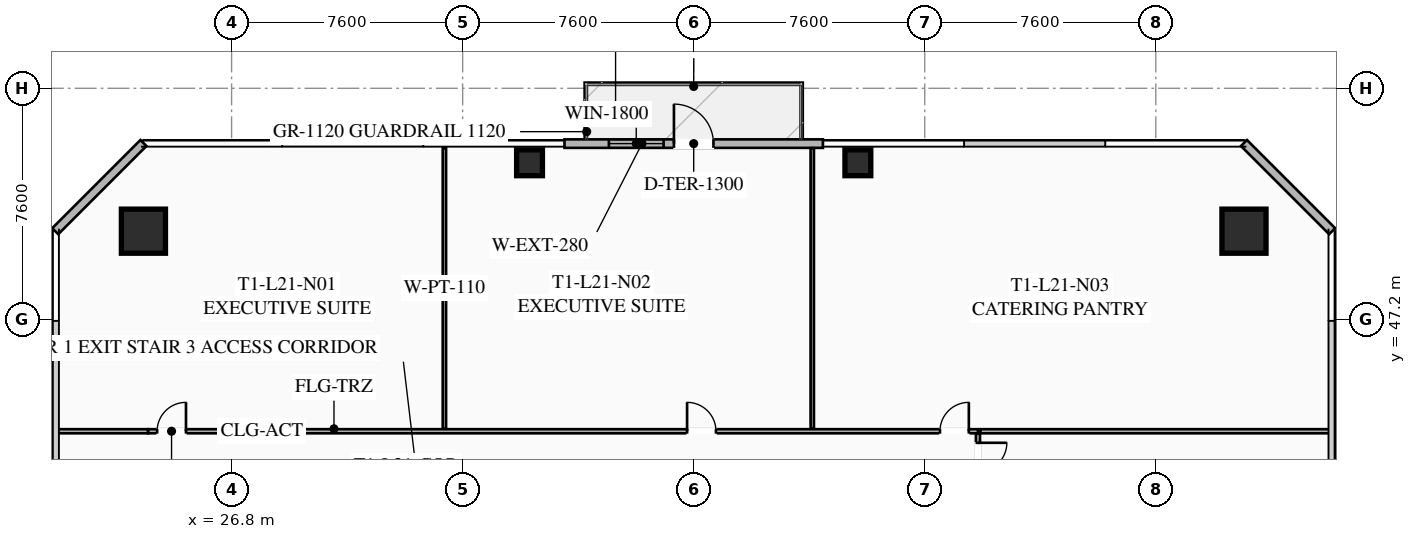
"""IFC4 building model, lengths in metres.
Left out: names, types, materials, properties, quantities, classifications, styles, units other than length and angle.
Written with IfcOpenShell. Run it as: python <this file> out.ifc"""

import sys

from ifc_helpers import new_model, si_unit, direction, frame, frame_2d, origin, origin_2d, place, context, subcontext, project, spatial, rectangle, hollow_rectangle, extrude, element, fill, save


model = new_model("IFC4")
c1 = context("Model", 3, precision=1e-05, world=origin(), true_north=direction((0.0, 1.0)))
c2 = subcontext(c1, "Body", "Model", "MODEL_VIEW")
j1 = project(units=[si_unit("LENGTHUNIT", "METRE"), si_unit("PLANEANGLEUNIT", "RADIAN")], contexts=[c1])
p1 = place(None, origin())
s1 = spatial("IfcSite", under=j1, at=p1, CompositionType="ELEMENT")
p2 = place(p1, origin())
s2 = spatial("IfcBuilding", under=s1, at=p2, CompositionType="ELEMENT")
p3 = place(p2, frame((0.0, 0.0, 81.4)))
s3 = spatial("IfcBuildingStorey", under=s2, at=p3, CompositionType="ELEMENT", Elevation=81.4)
for number, where, z_axis, x_axis in (
    (1, (60.1, 50.1, 0.0), (0.0, 0.0, 1.0), (1.0, 0.0, 0.0)),
    (2, (23.9, 50.1, 0.0), (0.0, 0.0, 1.0), (1.0, 0.0, 0.0)),
):
    element("IfcColumn", number, at=place(p3, frame(where, z_axis=z_axis, x_axis=x_axis)), inside=s3, PredefinedType="COLUMN", context=c2, shape_type="SweptSolid", body=[
        extrude(hollow_rectangle(XDim=1.45, YDim=1.45, WallThickness=0.055, at=origin_2d()), origin(), (0.0, 0.0, 1.0), 3.35),
    ])
for number, where, z_axis, x_axis in (
    (3, (47.4, 52.35, 0.0), (0.0, 0.0, 1.0), (1.0, 0.0, 0.0)),
    (4, (36.6, 52.35, 0.0), (0.0, 0.0, 1.0), (1.0, 0.0, 0.0)),
):
    element("IfcColumn", number, at=place(p3, frame(where, z_axis=z_axis, x_axis=x_axis)), inside=s3, PredefinedType="COLUMN", context=c2, shape_type="SweptSolid", body=[
        extrude(hollow_rectangle(XDim=0.85, YDim=0.85, WallThickness=0.035, at=origin_2d()), origin(), (0.0, 0.0, 1.0), 3.35),
    ])
p4 = place(p3, frame((37.75, 52.98, 0.0), z_axis=(0.0, 0.0, 1.0), x_axis=(1.0, 0.0, 0.0)))
e5 = element("IfcWall", 5, at=p4, inside=s3, PredefinedType="SOLIDWALL", context=c2, shape_type="SweptSolid", body=[
    extrude(rectangle(XDim=8.5, YDim=0.28, at=frame_2d((4.25, 0.0))), origin(), (0.0, 0.0, 1.0), 3.35),
])
p5 = place(p4, frame((3.6, 0.0, 0.0)))
e6 = element("IfcOpeningElement", 6, at=p5, cuts=e5, PredefinedType="OPENING", context=c2, shape_type="SweptSolid", body=[
    extrude(rectangle(XDim=1.3, YDim=2.15, at=frame_2d((0.65, 1.075))), frame((0.0, 0.15, 0.0), z_axis=(0.0, -1.0, 0.0), x_axis=(1.0, 0.0, 0.0)), (0.0, 0.0, 1.0), 0.3),
])
p6 = place(p4, frame((1.46, 0.0, 0.85)))
e7 = element("IfcOpeningElement", 7, at=p6, cuts=e5, PredefinedType="OPENING", context=c2, shape_type="SweptSolid", body=[
    extrude(rectangle(XDim=1.8, YDim=1.92, at=frame_2d((0.9, 0.96))), frame((0.0, 0.15, 0.0), z_axis=(0.0, -1.0, 0.0), x_axis=(1.0, 0.0, 0.0)), (0.0, 0.0, 1.0), 0.3),
])
for number, where, z_axis, x_axis in (
    (8, (21.0, 50.1, 0.0), (0.0, 0.0, 1.0), (0.707, 0.707, 0.0)),
    (9, (60.1, 53.0, 0.0), (0.0, 0.0, 1.0), (0.707, -0.707, 0.0)),
):
    element("IfcWall", number, at=place(p3, frame(where, z_axis=z_axis, x_axis=x_axis)), inside=s3, PredefinedType="SOLIDWALL", context=c2, shape_type="SweptSolid", body=[
        extrude(rectangle(XDim=4.101, YDim=0.28, at=frame_2d((2.051, 0.0))), origin(), (0.0, 0.0, 1.0), 3.35),
    ])
p7 = place(p3, frame((24.05, 43.52, 0.0), z_axis=(0.0, 0.0, 1.0), x_axis=(1.0, 0.0, 0.0)))
e10 = element("IfcWall", 10, at=p7, inside=s3, PredefinedType="PARTITIONING", context=c2, shape_type="SweptSolid", body=[
    extrude(rectangle(XDim=27.3, YDim=0.135, at=frame_2d((13.65, 0.0))), origin(), (0.0, 0.0, 1.0), 2.703),
])
p8 = place(p7, frame((0.3, 0.0, 0.0)))
e11 = element("IfcOpeningElement", 11, at=p8, cuts=e10, PredefinedType="OPENING", context=c2, shape_type="SweptSolid", body=[
    extrude(rectangle(XDim=0.95, YDim=2.05, at=frame_2d((0.475, 1.025))), frame((0.0, 0.077, 0.0), z_axis=(0.0, -1.0, 0.0), x_axis=(1.0, 0.0, 0.0)), (0.0, 0.0, 1.0), 0.155),
])
p9 = place(p7, frame((17.732, 0.0, 0.0)))
e12 = element("IfcOpeningElement", 12, at=p9, cuts=e10, PredefinedType="OPENING", context=c2, shape_type="SweptSolid", body=[
    extrude(rectangle(XDim=0.95, YDim=2.05, at=frame_2d((0.475, 1.025))), frame((0.0, 0.077, 0.0), z_axis=(0.0, -1.0, 0.0), x_axis=(1.0, 0.0, 0.0)), (0.0, 0.0, 1.0), 0.155),
])
p10 = place(p7, frame((26.05, 0.0, 0.0)))
e13 = element("IfcOpeningElement", 13, at=p10, cuts=e10, PredefinedType="OPENING", context=c2, shape_type="SweptSolid", body=[
    extrude(rectangle(XDim=0.95, YDim=2.05, at=frame_2d((0.475, 1.025))), frame((0.0, 0.077, 0.0), z_axis=(0.0, -1.0, 0.0), x_axis=(1.0, 0.0, 0.0)), (0.0, 0.0, 1.0), 0.155),
])
p11 = place(p3, frame((21.02, 43.52, 0.0), z_axis=(0.0, 0.0, 1.0), x_axis=(1.0, 0.0, 0.0)))
e14 = element("IfcWall", 14, at=p11, inside=s3, PredefinedType="PARTITIONING", context=c2, shape_type="SweptSolid", body=[
    extrude(rectangle(XDim=3.03, YDim=0.135, at=frame_2d((1.515, 0.0))), origin(), (0.0, 0.0, 1.0), 2.703),
])
for number, where, z_axis, x_axis in (
    (15, (33.8, 43.6, 0.0), (0.0, 0.0, 1.0), (0.0, 1.0, 0.0)),
    (16, (45.9, 43.6, 0.0), (0.0, 0.0, 1.0), (0.0, 1.0, 0.0)),
):
    element("IfcWall", number, at=place(p3, frame(where, z_axis=z_axis, x_axis=x_axis)), inside=s3, PredefinedType="PARTITIONING", context=c2, shape_type="SweptSolid", body=[
        extrude(rectangle(XDim=9.23, YDim=0.11, at=frame_2d((4.615, 0.0))), origin(), (0.0, 0.0, 1.0), 2.703),
    ])
p12 = place(p3, frame((51.35, 43.44, 0.0), z_axis=(0.0, 0.0, 1.0), x_axis=(0.0, -1.0, 0.0)))
e17 = element("IfcWall", 17, at=p12, inside=s3, PredefinedType="PARTITIONING", context=c2, shape_type="SweptSolid", body=[
    extrude(rectangle(XDim=20.71, YDim=0.135, at=frame_2d((10.355, 0.0))), origin(), (0.0, 0.0, 1.0), 2.703),
])
p13 = place(p12, frame((0.3, 0.0, 0.0)))
e18 = element("IfcOpeningElement", 18, at=p13, cuts=e17, PredefinedType="OPENING", context=c2, shape_type="SweptSolid", body=[
    extrude(rectangle(XDim=0.95, YDim=2.05, at=frame_2d((0.475, 1.025))), frame((0.0, 0.077, 0.0), z_axis=(0.0, -1.0, 0.0), x_axis=(1.0, 0.0, 0.0)), (0.0, 0.0, 1.0), 0.155),
])
p14 = place(p3, frame((62.98, 43.52, 0.0), z_axis=(0.0, 0.0, 1.0), x_axis=(-1.0, 0.0, 0.0)))
e19 = element("IfcWall", 19, at=p14, inside=s3, PredefinedType="PARTITIONING", context=c2, shape_type="SweptSolid", body=[
    extrude(rectangle(XDim=11.55, YDim=0.135, at=frame_2d((5.775, 0.0))), origin(), (0.0, 0.0, 1.0), 2.703),
])
p15 = place(p5, origin())
e20 = element("IfcDoor", 20, at=p15, inside=s3, OperationType="SINGLE_SWING_LEFT", PredefinedType="DOOR", context=c2, shape_type="SweptSolid", body=[
    extrude(rectangle(XDim=1.3, YDim=2.15, at=frame_2d((0.65, 1.075))), frame((0.0, 0.025, 0.0), z_axis=(0.0, -1.0, 0.0), x_axis=(1.0, 0.0, 0.0)), (0.0, 0.0, 1.0), 0.05),
])
fill(e6, e20)
p16 = place(p6, origin())
e21 = element("IfcWindow", 21, at=p16, inside=s3, PartitioningType="SINGLE_PANEL", PredefinedType="WINDOW", context=c2, shape_type="SweptSolid", body=[
    extrude(rectangle(XDim=1.8, YDim=1.92, at=frame_2d((0.9, 0.96))), frame((0.0, 0.03, 0.0), z_axis=(0.0, -1.0, 0.0), x_axis=(1.0, 0.0, 0.0)), (0.0, 0.0, 1.0), 0.06),
])
fill(e7, e21)
p17 = place(p8, origin())
e22 = element("IfcDoor", 22, at=p17, inside=s3, OperationType="SINGLE_SWING_RIGHT", PredefinedType="DOOR", context=c2, shape_type="SweptSolid", body=[
    extrude(rectangle(XDim=0.95, YDim=2.05, at=frame_2d((0.475, 1.025))), frame((0.0, 0.025, 0.0), z_axis=(0.0, -1.0, 0.0), x_axis=(1.0, 0.0, 0.0)), (0.0, 0.0, 1.0), 0.05),
])
fill(e11, e22)
p18 = place(p9, origin())
e23 = element("IfcDoor", 23, at=p18, inside=s3, OperationType="SINGLE_SWING_LEFT", PredefinedType="DOOR", context=c2, shape_type="SweptSolid", body=[
    extrude(rectangle(XDim=0.95, YDim=2.05, at=frame_2d((0.475, 1.025))), frame((0.0, 0.025, 0.0), z_axis=(0.0, -1.0, 0.0), x_axis=(1.0, 0.0, 0.0)), (0.0, 0.0, 1.0), 0.05),
])
fill(e12, e23)
p19 = place(p10, origin())
e24 = element("IfcDoor", 24, at=p19, inside=s3, OperationType="SINGLE_SWING_RIGHT", PredefinedType="DOOR", context=c2, shape_type="SweptSolid", body=[
    extrude(rectangle(XDim=0.95, YDim=2.05, at=frame_2d((0.475, 1.025))), frame((0.0, 0.025, 0.0), z_axis=(0.0, -1.0, 0.0), x_axis=(1.0, 0.0, 0.0)), (0.0, 0.0, 1.0), 0.05),
])
fill(e13, e24)
p20 = place(p13, origin())
e25 = element("IfcDoor", 25, at=p20, inside=s3, OperationType="SINGLE_SWING_LEFT", PredefinedType="DOOR", context=c2, shape_type="SweptSolid", body=[
    extrude(rectangle(XDim=0.95, YDim=2.05, at=frame_2d((0.475, 1.025))), frame((0.0, 0.025, 0.0), z_axis=(0.0, -1.0, 0.0), x_axis=(1.0, 0.0, 0.0)), (0.0, 0.0, 1.0), 0.05),
])
fill(e18, e25)
save(model, sys.argv[1])
